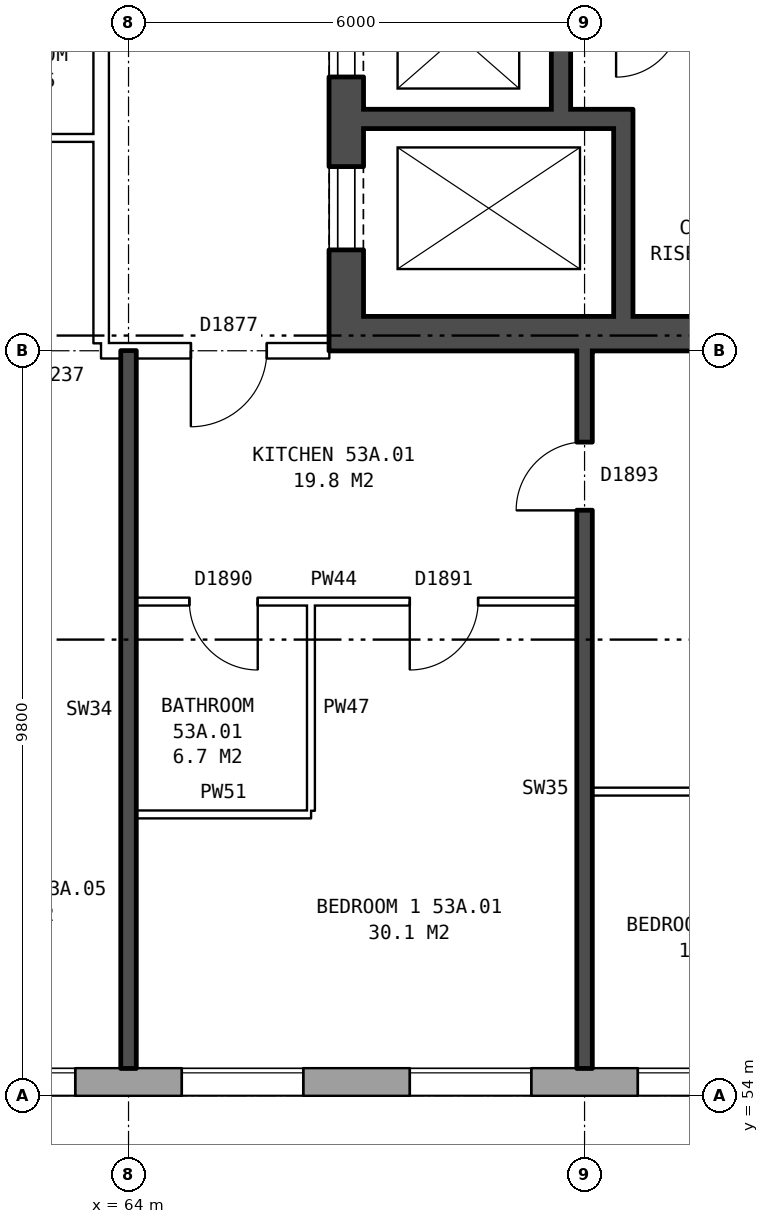
"""IFC4 building model, lengths in metres.
Left out: names, types, materials, properties, quantities, classifications, styles, units other than length and angle.
Written with IfcOpenShell. Run it as: python <this file> out.ifc"""

import sys

from ifc_helpers import new_model, si_unit, direction, frame, frame_2d, origin, place, context, subcontext, project, spatial, rectangle, extrude, element, fill, save


model = new_model("IFC4")
c1 = context("Model", 3, precision=1e-05, world=origin(), true_north=direction((0.0, 1.0)))
c2 = subcontext(c1, "Body", "Model", "MODEL_VIEW")
j1 = project(units=[si_unit("LENGTHUNIT", "METRE"), si_unit("PLANEANGLEUNIT", "RADIAN")], contexts=[c1])
p1 = place(None, origin())
s1 = spatial("IfcSite", under=j1, at=p1, CompositionType="ELEMENT")
p2 = place(p1, origin())
s2 = spatial("IfcBuilding", under=s1, at=p2, CompositionType="ELEMENT")
p3 = place(p2, frame((0.0, 0.0, 188.2)))
s3 = spatial("IfcBuildingStorey", under=s2, at=p3, CompositionType="ELEMENT", Elevation=188.2)
p4 = place(p3, frame((33.325, 54.18, 0.0), z_axis=(0.0, 0.0, 1.0), x_axis=(1.0, 0.0, 0.0)))
e1 = element("IfcWall", 1, at=p4, inside=s3, PredefinedType="STANDARD", context=c2, shape_type="SweptSolid", body=[
    extrude(rectangle(XDim=39.601, YDim=0.36, at=frame_2d((19.8, 0.0))), origin(), (0.0, 0.0, 1.0), 2.85),
])
p5 = place(p4, frame((1.375, 0.0, 0.8)))
e2 = element("IfcOpeningElement", 2, at=p5, cuts=e1, PredefinedType="OPENING", context=c2, shape_type="SweptSolid", body=[
    extrude(rectangle(XDim=1.6, YDim=1.8, at=frame_2d((0.8, 0.9))), frame((0.0, 0.19, 0.0), z_axis=(0.0, -1.0, 0.0), x_axis=(1.0, 0.0, 0.0)), (0.0, 0.0, 1.0), 0.38),
])
p6 = place(p4, frame((4.375, 0.0, 0.8)))
e3 = element("IfcOpeningElement", 3, at=p6, cuts=e1, PredefinedType="OPENING", context=c2, shape_type="SweptSolid", body=[
    extrude(rectangle(XDim=1.6, YDim=1.8, at=frame_2d((0.8, 0.9))), frame((0.0, 0.19, 0.0), z_axis=(0.0, -1.0, 0.0), x_axis=(1.0, 0.0, 0.0)), (0.0, 0.0, 1.0), 0.38),
])
p7 = place(p4, frame((7.375, 0.0, 0.8)))
e4 = element("IfcOpeningElement", 4, at=p7, cuts=e1, PredefinedType="OPENING", context=c2, shape_type="SweptSolid", body=[
    extrude(rectangle(XDim=1.6, YDim=1.8, at=frame_2d((0.8, 0.9))), frame((0.0, 0.19, 0.0), z_axis=(0.0, -1.0, 0.0), x_axis=(1.0, 0.0, 0.0)), (0.0, 0.0, 1.0), 0.38),
])
p8 = place(p4, frame((10.375, 0.0, 0.8)))
e5 = element("IfcOpeningElement", 5, at=p8, cuts=e1, PredefinedType="OPENING", context=c2, shape_type="SweptSolid", body=[
    extrude(rectangle(XDim=1.6, YDim=1.8, at=frame_2d((0.8, 0.9))), frame((0.0, 0.19, 0.0), z_axis=(0.0, -1.0, 0.0), x_axis=(1.0, 0.0, 0.0)), (0.0, 0.0, 1.0), 0.38),
])
p9 = place(p4, frame((12.875, 0.0, 0.8)))
e6 = element("IfcOpeningElement", 6, at=p9, cuts=e1, PredefinedType="OPENING", context=c2, shape_type="SweptSolid", body=[
    extrude(rectangle(XDim=1.2, YDim=1.8, at=frame_2d((0.6, 0.9))), frame((0.0, 0.19, 0.0), z_axis=(0.0, -1.0, 0.0), x_axis=(1.0, 0.0, 0.0)), (0.0, 0.0, 1.0), 0.38),
])
p10 = place(p4, frame((16.225, 0.0, 0.8)))
e7 = element("IfcOpeningElement", 7, at=p10, cuts=e1, PredefinedType="OPENING", context=c2, shape_type="SweptSolid", body=[
    extrude(rectangle(XDim=0.6, YDim=0.9, at=frame_2d((0.3, 0.45))), frame((0.0, 0.19, 0.0), z_axis=(0.0, -1.0, 0.0), x_axis=(1.0, 0.0, 0.0)), (0.0, 0.0, 1.0), 0.38),
])
p11 = place(p4, frame((19.375, 0.0, 0.8)))
e8 = element("IfcOpeningElement", 8, at=p11, cuts=e1, PredefinedType="OPENING", context=c2, shape_type="SweptSolid", body=[
    extrude(rectangle(XDim=1.6, YDim=1.8, at=frame_2d((0.8, 0.9))), frame((0.0, 0.19, 0.0), z_axis=(0.0, -1.0, 0.0), x_axis=(1.0, 0.0, 0.0)), (0.0, 0.0, 1.0), 0.38),
])
p12 = place(p4, frame((21.875, 0.0, 0.15)))
e9 = element("IfcOpeningElement", 9, at=p12, cuts=e1, PredefinedType="OPENING", context=c2, shape_type="SweptSolid", body=[
    extrude(rectangle(XDim=1.2, YDim=1.8, at=frame_2d((0.6, 0.9))), frame((0.0, 0.19, 0.0), z_axis=(0.0, -1.0, 0.0), x_axis=(1.0, 0.0, 0.0)), (0.0, 0.0, 1.0), 0.38),
])
p13 = place(p4, frame((25.375, 0.0, 0.8)))
e10 = element("IfcOpeningElement", 10, at=p13, cuts=e1, PredefinedType="OPENING", context=c2, shape_type="SweptSolid", body=[
    extrude(rectangle(XDim=1.6, YDim=1.8, at=frame_2d((0.8, 0.9))), frame((0.0, 0.19, 0.0), z_axis=(0.0, -1.0, 0.0), x_axis=(1.0, 0.0, 0.0)), (0.0, 0.0, 1.0), 0.38),
])
p14 = place(p4, frame((28.375, 0.0, 0.8)))
e11 = element("IfcOpeningElement", 11, at=p14, cuts=e1, PredefinedType="OPENING", context=c2, shape_type="SweptSolid", body=[
    extrude(rectangle(XDim=1.6, YDim=1.8, at=frame_2d((0.8, 0.9))), frame((0.0, 0.19, 0.0), z_axis=(0.0, -1.0, 0.0), x_axis=(1.0, 0.0, 0.0)), (0.0, 0.0, 1.0), 0.38),
])
p15 = place(p4, frame((31.375, 0.0, 0.8)))
e12 = element("IfcOpeningElement", 12, at=p15, cuts=e1, PredefinedType="OPENING", context=c2, shape_type="SweptSolid", body=[
    extrude(rectangle(XDim=1.6, YDim=1.8, at=frame_2d((0.8, 0.9))), frame((0.0, 0.19, 0.0), z_axis=(0.0, -1.0, 0.0), x_axis=(1.0, 0.0, 0.0)), (0.0, 0.0, 1.0), 0.38),
])
p16 = place(p4, frame((34.375, 0.0, 0.8)))
e13 = element("IfcOpeningElement", 13, at=p16, cuts=e1, PredefinedType="OPENING", context=c2, shape_type="SweptSolid", body=[
    extrude(rectangle(XDim=1.6, YDim=1.8, at=frame_2d((0.8, 0.9))), frame((0.0, 0.19, 0.0), z_axis=(0.0, -1.0, 0.0), x_axis=(1.0, 0.0, 0.0)), (0.0, 0.0, 1.0), 0.38),
])
p17 = place(p4, frame((37.375, 0.0, 0.8)))
e14 = element("IfcOpeningElement", 14, at=p17, cuts=e1, PredefinedType="OPENING", context=c2, shape_type="SweptSolid", body=[
    extrude(rectangle(XDim=1.6, YDim=1.8, at=frame_2d((0.8, 0.9))), frame((0.0, 0.19, 0.0), z_axis=(0.0, -1.0, 0.0), x_axis=(1.0, 0.0, 0.0)), (0.0, 0.0, 1.0), 0.38),
])
p18 = place(p4, frame((14.375, 0.0, 1.6)))
e15 = element("IfcOpeningElement", 15, at=p18, cuts=e1, PredefinedType="OPENING", context=c2, shape_type="SweptSolid", body=[
    extrude(rectangle(XDim=0.6, YDim=0.9, at=frame_2d((0.3, 0.45))), frame((0.0, 0.19, 0.0), z_axis=(0.0, -1.0, 0.0), x_axis=(1.0, 0.0, 0.0)), (0.0, 0.0, 1.0), 0.38),
])
p19 = place(p4, frame((17.125, 0.0, 0.8)))
e16 = element("IfcOpeningElement", 16, at=p19, cuts=e1, PredefinedType="OPENING", context=c2, shape_type="SweptSolid", body=[
    extrude(rectangle(XDim=1.2, YDim=1.8, at=frame_2d((0.6, 0.9))), frame((0.0, 0.19, 0.0), z_axis=(0.0, -1.0, 0.0), x_axis=(1.0, 0.0, 0.0)), (0.0, 0.0, 1.0), 0.38),
])
p20 = place(p4, frame((23.375, 0.0, 0.15)))
e17 = element("IfcOpeningElement", 17, at=p20, cuts=e1, PredefinedType="OPENING", context=c2, shape_type="SweptSolid", body=[
    extrude(rectangle(XDim=0.6, YDim=0.9, at=frame_2d((0.3, 0.45))), frame((0.0, 0.19, 0.0), z_axis=(0.0, -1.0, 0.0), x_axis=(1.0, 0.0, 0.0)), (0.0, 0.0, 1.0), 0.38),
])
p21 = place(p3, frame((66.865, 63.8, 0.0), z_axis=(0.0, 0.0, 1.0), x_axis=(0.0, 1.0, 0.0)))
e18 = element("IfcWall", 18, at=p21, inside=s3, PredefinedType="SHEAR", context=c2, shape_type="SweptSolid", body=[
    extrude(rectangle(XDim=12.4, YDim=0.45, at=frame_2d((6.2, 0.0))), origin(), (0.0, 0.0, 1.0), 2.85),
])
p22 = place(p21, frame((1.325, 0.0, 0.0)))
e19 = element("IfcOpeningElement", 19, at=p22, cuts=e18, PredefinedType="OPENING", context=c2, shape_type="SweptSolid", body=[
    extrude(rectangle(XDim=1.1, YDim=2.1, at=frame_2d((0.55, 1.05))), frame((0.0, 0.235, 0.0), z_axis=(0.0, -1.0, 0.0), x_axis=(1.0, 0.0, 0.0)), (0.0, 0.0, 1.0), 0.47),
])
p23 = place(p21, frame((3.6, 0.0, 0.0)))
e20 = element("IfcOpeningElement", 20, at=p23, cuts=e18, PredefinedType="OPENING", context=c2, shape_type="SweptSolid", body=[
    extrude(rectangle(XDim=1.1, YDim=2.1, at=frame_2d((0.55, 1.05))), frame((0.0, 0.235, 0.0), z_axis=(0.0, -1.0, 0.0), x_axis=(1.0, 0.0, 0.0)), (0.0, 0.0, 1.0), 0.47),
])
p24 = place(p21, frame((5.8, 0.0, 0.0)))
e21 = element("IfcOpeningElement", 21, at=p24, cuts=e18, PredefinedType="OPENING", context=c2, shape_type="SweptSolid", body=[
    extrude(rectangle(XDim=1.1, YDim=2.1, at=frame_2d((0.55, 1.05))), frame((0.0, 0.235, 0.0), z_axis=(0.0, -1.0, 0.0), x_axis=(1.0, 0.0, 0.0)), (0.0, 0.0, 1.0), 0.47),
])
p25 = place(p21, frame((8.0, 0.0, 0.0)))
e22 = element("IfcOpeningElement", 22, at=p25, cuts=e18, PredefinedType="OPENING", context=c2, shape_type="SweptSolid", body=[
    extrude(rectangle(XDim=1.1, YDim=2.1, at=frame_2d((0.55, 1.05))), frame((0.0, 0.235, 0.0), z_axis=(0.0, -1.0, 0.0), x_axis=(1.0, 0.0, 0.0)), (0.0, 0.0, 1.0), 0.47),
])
p26 = place(p21, frame((9.9, 0.0, 0.0)))
e23 = element("IfcOpeningElement", 23, at=p26, cuts=e18, PredefinedType="OPENING", context=c2, shape_type="SweptSolid", body=[
    extrude(rectangle(XDim=1.1, YDim=2.1, at=frame_2d((0.55, 1.05))), frame((0.0, 0.235, 0.0), z_axis=(0.0, -1.0, 0.0), x_axis=(1.0, 0.0, 0.0)), (0.0, 0.0, 1.0), 0.47),
])
p27 = place(p3, frame((67.09, 64.025, 0.0), z_axis=(0.0, 0.0, 1.0), x_axis=(1.0, 0.0, 0.0)))
e24 = element("IfcWall", 24, at=p27, inside=s3, PredefinedType="SHEAR", context=c2, shape_type="SweptSolid", body=[
    extrude(rectangle(XDim=8.1, YDim=0.45, at=frame_2d((4.05, 0.0))), origin(), (0.0, 0.0, 1.0), 2.85),
])
p28 = place(p3, frame((67.09, 66.85, 0.0), z_axis=(0.0, 0.0, 1.0), x_axis=(1.0, 0.0, 0.0)))
e25 = element("IfcWall", 25, at=p28, inside=s3, PredefinedType="SHEAR", context=c2, shape_type="SweptSolid", body=[
    extrude(rectangle(XDim=3.545, YDim=0.25, at=frame_2d((1.772, 0.0))), origin(), (0.0, 0.0, 1.0), 2.85),
])
p29 = place(p3, frame((69.69, 66.975, 0.0), z_axis=(0.0, 0.0, 1.0), x_axis=(0.0, 1.0, 0.0)))
e26 = element("IfcWall", 26, at=p29, inside=s3, PredefinedType="SHEAR", context=c2, shape_type="SweptSolid", body=[
    extrude(rectangle(XDim=6.6, YDim=0.25, at=frame_2d((3.3, 0.0))), origin(), (0.0, 0.0, 1.0), 2.85),
])
p30 = place(p3, frame((70.51, 64.25, 0.0), z_axis=(0.0, 0.0, 1.0), x_axis=(0.0, 1.0, 0.0)))
e27 = element("IfcWall", 27, at=p30, inside=s3, PredefinedType="SHEAR", context=c2, shape_type="SweptSolid", body=[
    extrude(rectangle(XDim=2.475, YDim=0.25, at=frame_2d((1.238, 0.0))), origin(), (0.0, 0.0, 1.0), 2.85),
])
p31 = place(p3, frame((63.64, 63.9, 0.0), z_axis=(0.0, 0.0, 1.0), x_axis=(0.0, 1.0, 0.0)))
e28 = element("IfcWall", 28, at=p31, inside=s3, PredefinedType="PARTITIONING", context=c2, shape_type="SweptSolid", body=[
    extrude(rectangle(XDim=12.2, YDim=0.2, at=frame_2d((6.1, 0.0))), origin(), (0.0, 0.0, 1.0), 2.85),
])
p32 = place(p31, frame((5.1, 0.0, 0.0)))
e29 = element("IfcOpeningElement", 29, at=p32, cuts=e28, PredefinedType="OPENING", context=c2, shape_type="SweptSolid", body=[
    extrude(rectangle(XDim=2.0, YDim=2.1, at=frame_2d((1.0, 1.05))), frame((0.0, 0.11, 0.0), z_axis=(0.0, -1.0, 0.0), x_axis=(1.0, 0.0, 0.0)), (0.0, 0.0, 1.0), 0.22),
])
p33 = place(p3, frame((64.1, 57.7, 0.0), z_axis=(0.0, 0.0, 1.0), x_axis=(1.0, 0.0, 0.0)))
e30 = element("IfcWall", 30, at=p33, inside=s3, PredefinedType="PARTITIONING", context=c2, shape_type="SweptSolid", body=[
    extrude(rectangle(XDim=2.3, YDim=0.1, at=frame_2d((1.15, 0.0))), origin(), (0.0, 0.0, 1.0), 2.85),
])
p34 = place(p3, frame((70.1, 58.0, 0.0), z_axis=(0.0, 0.0, 1.0), x_axis=(1.0, 0.0, 0.0)))
e31 = element("IfcWall", 31, at=p34, inside=s3, PredefinedType="PARTITIONING", context=c2, shape_type="SweptSolid", body=[
    extrude(rectangle(XDim=5.54, YDim=0.1, at=frame_2d((2.77, 0.0))), origin(), (0.0, 0.0, 1.0), 2.85),
])
p35 = place(p34, frame((2.32, 0.0, 0.0)))
e32 = element("IfcOpeningElement", 32, at=p35, cuts=e31, PredefinedType="OPENING", context=c2, shape_type="SweptSolid", body=[
    extrude(rectangle(XDim=0.9, YDim=2.1, at=frame_2d((0.45, 1.05))), frame((0.0, 0.06, 0.0), z_axis=(0.0, -1.0, 0.0), x_axis=(1.0, 0.0, 0.0)), (0.0, 0.0, 1.0), 0.12),
])
p36 = place(p3, frame((64.1, 60.5, 0.0), z_axis=(0.0, 0.0, 1.0), x_axis=(1.0, 0.0, 0.0)))
e33 = element("IfcWall", 33, at=p36, inside=s3, PredefinedType="PARTITIONING", context=c2, shape_type="SweptSolid", body=[
    extrude(rectangle(XDim=5.8, YDim=0.1, at=frame_2d((2.9, 0.0))), origin(), (0.0, 0.0, 1.0), 2.85),
])
p37 = place(p36, frame((3.6, 0.0, 0.0)))
e34 = element("IfcOpeningElement", 34, at=p37, cuts=e33, PredefinedType="OPENING", context=c2, shape_type="SweptSolid", body=[
    extrude(rectangle(XDim=0.9, YDim=2.1, at=frame_2d((0.45, 1.05))), frame((0.0, 0.06, 0.0), z_axis=(0.0, -1.0, 0.0), x_axis=(1.0, 0.0, 0.0)), (0.0, 0.0, 1.0), 0.12),
])
p38 = place(p36, frame((0.7, 0.0, 0.0)))
e35 = element("IfcOpeningElement", 35, at=p38, cuts=e33, PredefinedType="OPENING", context=c2, shape_type="SweptSolid", body=[
    extrude(rectangle(XDim=0.9, YDim=2.1, at=frame_2d((0.45, 1.05))), frame((0.0, 0.06, 0.0), z_axis=(0.0, -1.0, 0.0), x_axis=(1.0, 0.0, 0.0)), (0.0, 0.0, 1.0), 0.12),
])
p39 = place(p3, frame((63.64, 63.8, 0.0), z_axis=(0.0, 0.0, 1.0), x_axis=(1.0, 0.0, 0.0)))
e36 = element("IfcWall", 36, at=p39, inside=s3, PredefinedType="PARTITIONING", context=c2, shape_type="SweptSolid", body=[
    extrude(rectangle(XDim=3.0, YDim=0.2, at=frame_2d((1.5, 0.0))), origin(), (0.0, 0.0, 1.0), 2.85),
])
p40 = place(p39, frame((1.18, 0.0, 0.0)))
e37 = element("IfcOpeningElement", 37, at=p40, cuts=e36, PredefinedType="OPENING", context=c2, shape_type="SweptSolid", body=[
    extrude(rectangle(XDim=1.0, YDim=2.1, at=frame_2d((0.5, 1.05))), frame((0.0, 0.11, 0.0), z_axis=(0.0, -1.0, 0.0), x_axis=(1.0, 0.0, 0.0)), (0.0, 0.0, 1.0), 0.22),
])
p41 = place(p3, frame((61.0, 66.6, 0.0), z_axis=(0.0, 0.0, 1.0), x_axis=(1.0, 0.0, 0.0)))
e38 = element("IfcWall", 38, at=p41, inside=s3, PredefinedType="PARTITIONING", context=c2, shape_type="SweptSolid", body=[
    extrude(rectangle(XDim=2.64, YDim=0.1, at=frame_2d((1.32, 0.0))), origin(), (0.0, 0.0, 1.0), 2.85),
])
p42 = place(p3, frame((64.0, 54.36, 0.0), z_axis=(0.0, 0.0, 1.0), x_axis=(0.0, 1.0, 0.0)))
e39 = element("IfcWall", 39, at=p42, inside=s3, PredefinedType="SOLIDWALL", context=c2, shape_type="SweptSolid", body=[
    extrude(rectangle(XDim=9.44, YDim=0.2, at=frame_2d((4.72, 0.0))), origin(), (0.0, 0.0, 1.0), 2.85),
])
p43 = place(p3, frame((66.4, 57.75, 0.0), z_axis=(0.0, 0.0, 1.0), x_axis=(0.0, 1.0, 0.0)))
e40 = element("IfcWall", 40, at=p43, inside=s3, PredefinedType="PARTITIONING", context=c2, shape_type="SweptSolid", body=[
    extrude(rectangle(XDim=2.7, YDim=0.1, at=frame_2d((1.35, 0.0))), origin(), (0.0, 0.0, 1.0), 2.85),
])
p44 = place(p3, frame((70.0, 54.36, 0.0), z_axis=(0.0, 0.0, 1.0), x_axis=(0.0, 1.0, 0.0)))
e41 = element("IfcWall", 41, at=p44, inside=s3, PredefinedType="SOLIDWALL", context=c2, shape_type="SweptSolid", body=[
    extrude(rectangle(XDim=9.44, YDim=0.2, at=frame_2d((4.72, 0.0))), origin(), (0.0, 0.0, 1.0), 2.85),
])
p45 = place(p44, frame((7.34, 0.0, 0.0)))
e42 = element("IfcOpeningElement", 42, at=p45, cuts=e41, PredefinedType="OPENING", context=c2, shape_type="SweptSolid", body=[
    extrude(rectangle(XDim=0.9, YDim=2.1, at=frame_2d((0.45, 1.05))), frame((0.0, 0.11, 0.0), z_axis=(0.0, -1.0, 0.0), x_axis=(1.0, 0.0, 0.0)), (0.0, 0.0, 1.0), 0.22),
])
p46 = place(p14, origin())
e43 = element("IfcWindow", 43, at=p46, inside=s3, PartitioningType="SINGLE_PANEL", PredefinedType="WINDOW", context=c2, shape_type="SweptSolid", body=[
    extrude(rectangle(XDim=1.6, YDim=1.8, at=frame_2d((0.8, 0.9))), frame((0.0, 0.15, 0.0), z_axis=(0.0, -1.0, 0.0), x_axis=(1.0, 0.0, 0.0)), (0.0, 0.0, 1.0), 0.06),
])
fill(e11, e43)
p47 = place(p15, origin())
e44 = element("IfcWindow", 44, at=p47, inside=s3, PartitioningType="SINGLE_PANEL", PredefinedType="WINDOW", context=c2, shape_type="SweptSolid", body=[
    extrude(rectangle(XDim=1.6, YDim=1.8, at=frame_2d((0.8, 0.9))), frame((0.0, 0.15, 0.0), z_axis=(0.0, -1.0, 0.0), x_axis=(1.0, 0.0, 0.0)), (0.0, 0.0, 1.0), 0.06),
])
fill(e12, e44)
p48 = place(p16, origin())
e45 = element("IfcWindow", 45, at=p48, inside=s3, PartitioningType="SINGLE_PANEL", PredefinedType="WINDOW", context=c2, shape_type="SweptSolid", body=[
    extrude(rectangle(XDim=1.6, YDim=1.8, at=frame_2d((0.8, 0.9))), frame((0.0, 0.15, 0.0), z_axis=(0.0, -1.0, 0.0), x_axis=(1.0, 0.0, 0.0)), (0.0, 0.0, 1.0), 0.06),
])
fill(e13, e45)
p49 = place(p17, origin())
e46 = element("IfcWindow", 46, at=p49, inside=s3, PartitioningType="SINGLE_PANEL", PredefinedType="WINDOW", context=c2, shape_type="SweptSolid", body=[
    extrude(rectangle(XDim=1.6, YDim=1.8, at=frame_2d((0.8, 0.9))), frame((0.0, 0.15, 0.0), z_axis=(0.0, -1.0, 0.0), x_axis=(1.0, 0.0, 0.0)), (0.0, 0.0, 1.0), 0.06),
])
fill(e14, e46)
p50 = place(p22, origin())
e47 = element("IfcDoor", 47, at=p50, inside=s3, OperationType="DOUBLE_DOOR_SLIDING", PredefinedType="DOOR", context=c2, shape_type="SweptSolid", body=[
    extrude(rectangle(XDim=1.1, YDim=2.1, at=frame_2d((0.55, 1.05))), frame((0.0, -0.16, 0.0), z_axis=(0.0, -1.0, 0.0), x_axis=(1.0, 0.0, 0.0)), (0.0, 0.0, 1.0), 0.05),
])
fill(e19, e47)
p51 = place(p23, origin())
e48 = element("IfcDoor", 48, at=p51, inside=s3, OperationType="DOUBLE_DOOR_SLIDING", PredefinedType="DOOR", context=c2, shape_type="SweptSolid", body=[
    extrude(rectangle(XDim=1.1, YDim=2.1, at=frame_2d((0.55, 1.05))), frame((0.0, -0.16, 0.0), z_axis=(0.0, -1.0, 0.0), x_axis=(1.0, 0.0, 0.0)), (0.0, 0.0, 1.0), 0.05),
])
fill(e20, e48)
p52 = place(p37, frame((0.9, 0.0, 0.0), z_axis=(0.0, 0.0, 1.0), x_axis=(-1.0, 0.0, 0.0)))
e49 = element("IfcDoor", 49, at=p52, inside=s3, OperationType="SINGLE_SWING_RIGHT", PredefinedType="DOOR", context=c2, shape_type="SweptSolid", body=[
    extrude(rectangle(XDim=0.9, YDim=2.1, at=frame_2d((0.45, 1.05))), frame((0.0, 0.025, 0.0), z_axis=(0.0, -1.0, 0.0), x_axis=(1.0, 0.0, 0.0)), (0.0, 0.0, 1.0), 0.05),
])
fill(e34, e49)
p53 = place(p40, frame((1.0, 0.0, 0.0), z_axis=(0.0, 0.0, 1.0), x_axis=(-1.0, 0.0, 0.0)))
e50 = element("IfcDoor", 50, at=p53, inside=s3, OperationType="SINGLE_SWING_RIGHT", PredefinedType="DOOR", context=c2, shape_type="SweptSolid", body=[
    extrude(rectangle(XDim=1.0, YDim=2.1, at=frame_2d((0.5, 1.05))), frame((0.0, 0.025, 0.0), z_axis=(0.0, -1.0, 0.0), x_axis=(1.0, 0.0, 0.0)), (0.0, 0.0, 1.0), 0.05),
])
fill(e37, e50)
p54 = place(p45, origin())
e51 = element("IfcDoor", 51, at=p54, inside=s3, OperationType="SINGLE_SWING_LEFT", PredefinedType="DOOR", context=c2, shape_type="SweptSolid", body=[
    extrude(rectangle(XDim=0.9, YDim=2.1, at=frame_2d((0.45, 1.05))), frame((0.0, 0.025, 0.0), z_axis=(0.0, -1.0, 0.0), x_axis=(1.0, 0.0, 0.0)), (0.0, 0.0, 1.0), 0.05),
])
fill(e42, e51)
p55 = place(p38, frame((0.9, 0.0, 0.0), z_axis=(0.0, 0.0, 1.0), x_axis=(-1.0, 0.0, 0.0)))
e52 = element("IfcDoor", 52, at=p55, inside=s3, OperationType="SINGLE_SWING_LEFT", PredefinedType="DOOR", context=c2, shape_type="SweptSolid", body=[
    extrude(rectangle(XDim=0.9, YDim=2.1, at=frame_2d((0.45, 1.05))), frame((0.0, 0.025, 0.0), z_axis=(0.0, -1.0, 0.0), x_axis=(1.0, 0.0, 0.0)), (0.0, 0.0, 1.0), 0.05),
])
fill(e35, e52)
save(model, sys.argv[1])
